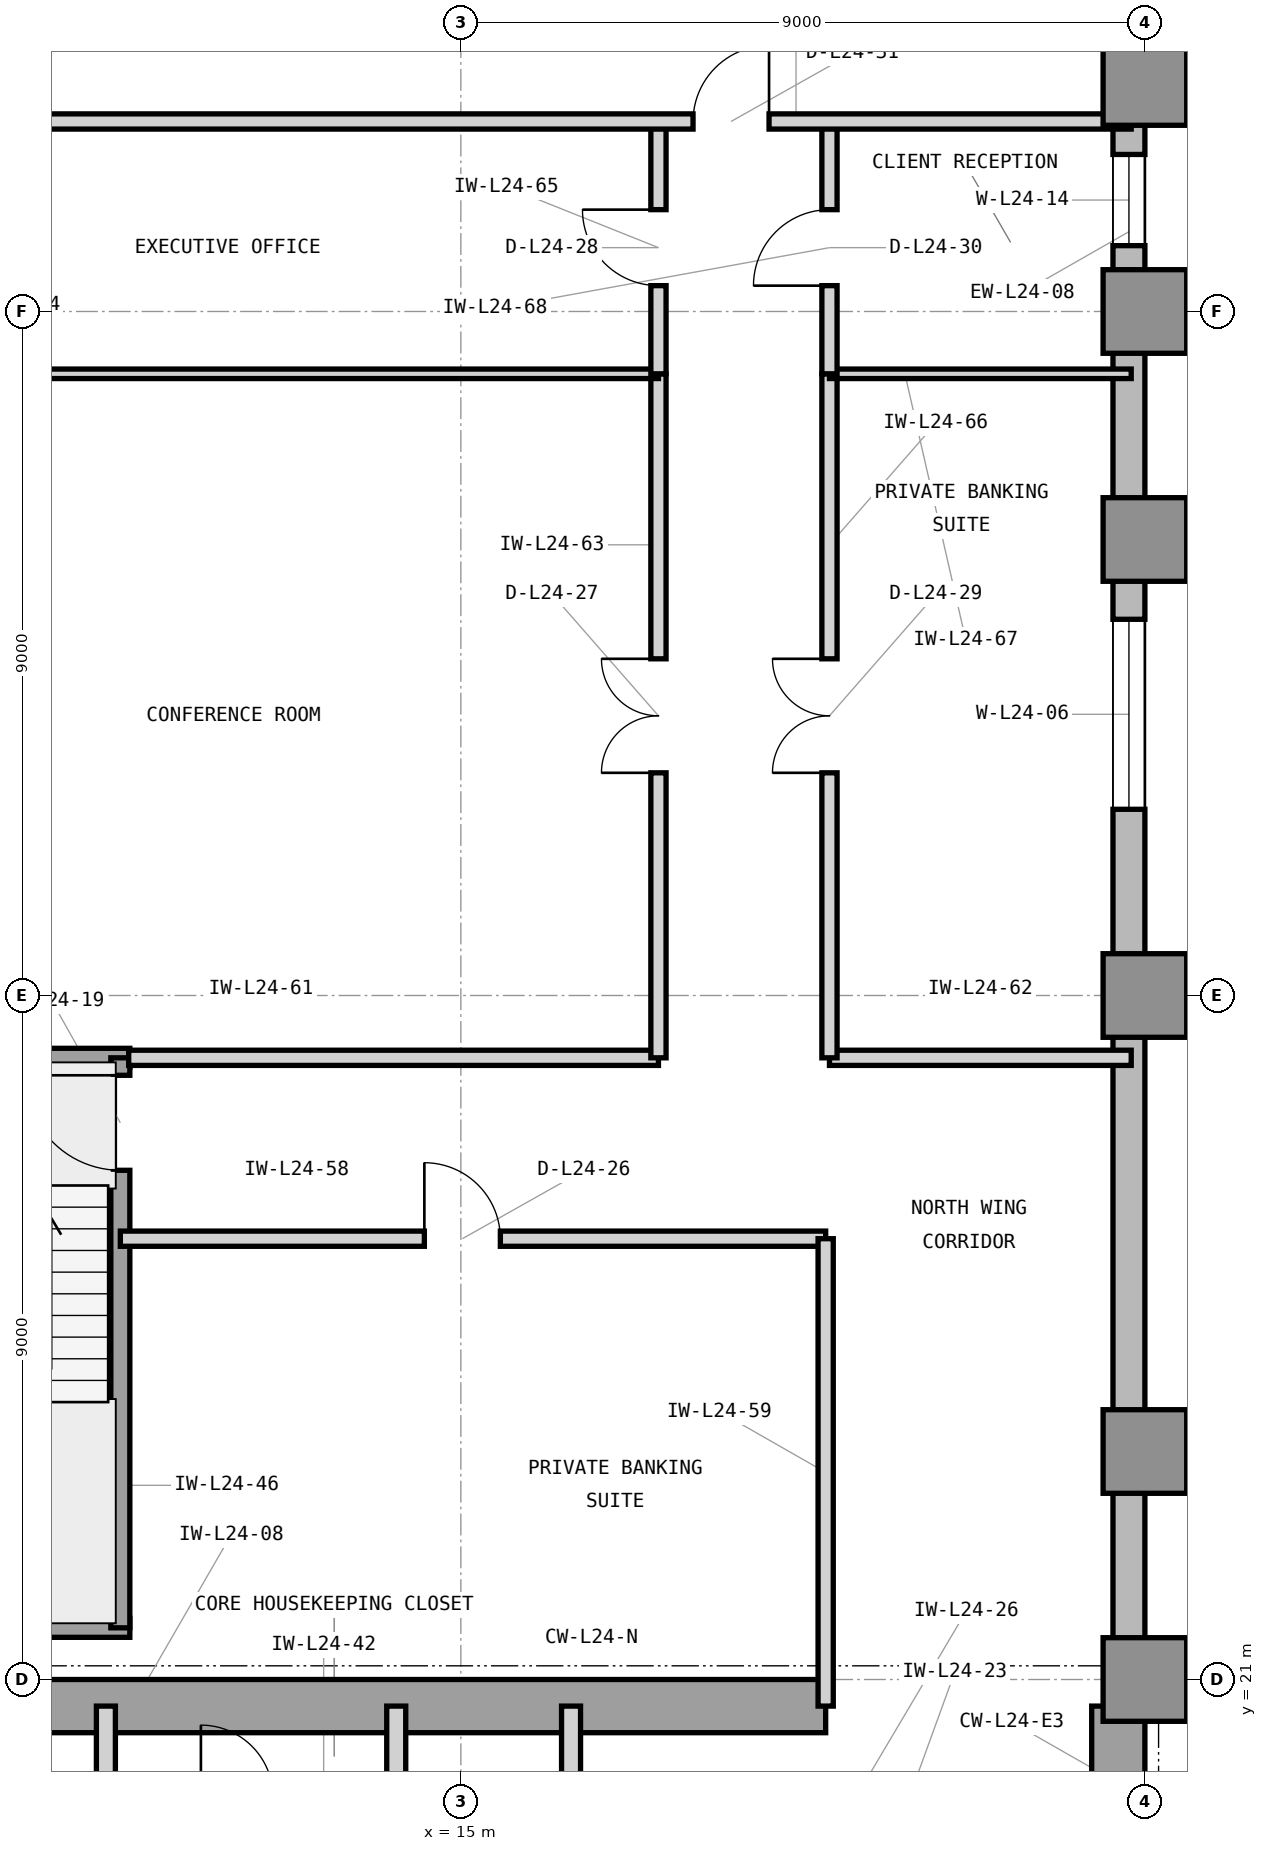
"""IFC4 building model, lengths in metres.
Left out: names, types, materials, properties, quantities, classifications, styles, units other than length and angle.
Written with IfcOpenShell. Run it as: python <this file> out.ifc"""

import sys

from ifc_helpers import new_model, si_unit, direction, frame, frame_2d, origin, origin_2d, place, context, subcontext, project, spatial, rectangle, extrude, element, fill, save


model = new_model("IFC4")
c1 = context("Model", 3, precision=1e-05, world=origin(), true_north=direction((0.0, 1.0)))
c2 = subcontext(c1, "Body", "Model", "MODEL_VIEW")
j1 = project(units=[si_unit("LENGTHUNIT", "METRE"), si_unit("PLANEANGLEUNIT", "RADIAN")], contexts=[c1])
p1 = place(None, origin())
s1 = spatial("IfcSite", under=j1, at=p1, CompositionType="ELEMENT")
p2 = place(p1, origin())
s2 = spatial("IfcBuilding", under=s1, at=p2, CompositionType="ELEMENT")
p3 = place(p2, frame((0.0, 0.0, 105.0)))
s3 = spatial("IfcBuildingStorey", under=s2, at=p3, CompositionType="ELEMENT", Elevation=105.0)
p4 = place(p3, frame((7.475, 20.65, 0.0), z_axis=(0.0, 0.0, 1.0), x_axis=(1.0, 0.0, 0.0)))
e1 = element("IfcWall", 1, at=p4, inside=s3, PredefinedType="SHEAR", context=c2, shape_type="SweptSolid", body=[
    extrude(rectangle(XDim=12.325, YDim=0.7, at=frame_2d((6.163, 0.0))), origin(), (0.0, 0.0, 1.0), 3.9),
])
p5 = place(p3, frame((23.65, 16.6, 0.0), z_axis=(0.0, 0.0, 1.0), x_axis=(0.0, 1.0, 0.0)))
e2 = element("IfcWall", 2, at=p5, inside=s3, PredefinedType="SHEAR", context=c2, shape_type="SweptSolid", body=[
    extrude(rectangle(XDim=4.05, YDim=0.7, at=frame_2d((2.025, 0.0))), origin(), (0.0, 0.0, 1.0), 3.9),
])
for number, where, z_axis, x_axis in (
    (3, (24.0, 21.0, 0.0), (0.0, 0.0, 1.0), (1.0, 0.0, 0.0)),
    (4, (24.0, 24.0, 0.0), (0.0, 0.0, 1.0), (1.0, 0.0, 0.0)),
    (5, (24.0, 30.0, 0.0), (0.0, 0.0, 1.0), (1.0, 0.0, 0.0)),
    (6, (24.0, 36.0, 0.0), (0.0, 0.0, 1.0), (1.0, 0.0, 0.0)),
    (7, (24.0, 39.0, 0.0), (0.0, 0.0, 1.0), (1.0, 0.0, 0.0)),
    (8, (24.0, 42.0, 0.0), (0.0, 0.0, 1.0), (1.0, 0.0, 0.0)),
):
    element("IfcColumn", number, at=place(p3, frame(where, z_axis=z_axis, x_axis=x_axis)), inside=s3, PredefinedType="COLUMN", context=c2, shape_type="SweptSolid", body=[
        extrude(rectangle(XDim=1.1, YDim=1.1, at=origin_2d()), origin(), (0.0, 0.0, 1.0), 3.9),
    ])
p6 = place(p3, frame((61.4, 20.79, 0.0), z_axis=(0.0, 0.0, 1.0), x_axis=(-1.0, 0.0, 0.0)))
e9 = element("IfcWall", 9, at=p6, inside=s3, PredefinedType="STANDARD", context=c2, shape_type="SweptSolid", body=[
    extrude(rectangle(XDim=37.4, YDim=0.42, at=frame_2d((18.7, 0.0))), origin(), (0.0, 0.0, 1.0), 3.7),
])
p7 = place(p6, frame((15.113, 0.0, 0.85)))
e10 = element("IfcOpeningElement", 10, at=p7, cuts=e9, PredefinedType="OPENING", context=c2, shape_type="SweptSolid", body=[
    extrude(rectangle(XDim=2.5, YDim=2.25, at=frame_2d((1.25, 1.125))), frame((0.0, 0.22, 0.0), z_axis=(0.0, -1.0, 0.0), x_axis=(1.0, 0.0, 0.0)), (0.0, 0.0, 1.0), 0.44),
])
p8 = place(p6, frame((24.462, 0.0, 0.85)))
e11 = element("IfcOpeningElement", 11, at=p8, cuts=e9, PredefinedType="OPENING", context=c2, shape_type="SweptSolid", body=[
    extrude(rectangle(XDim=2.5, YDim=2.25, at=frame_2d((1.25, 1.125))), frame((0.0, 0.22, 0.0), z_axis=(0.0, -1.0, 0.0), x_axis=(1.0, 0.0, 0.0)), (0.0, 0.0, 1.0), 0.44),
])
p9 = place(p3, frame((23.79, 21.0, 0.0), z_axis=(0.0, 0.0, 1.0), x_axis=(0.0, 1.0, 0.0)))
e12 = element("IfcWall", 12, at=p9, inside=s3, PredefinedType="STANDARD", context=c2, shape_type="SweptSolid", body=[
    extrude(rectangle(XDim=25.4, YDim=0.42, at=frame_2d((12.7, 0.0))), origin(), (0.0, 0.0, 1.0), 3.7),
])
p10 = place(p9, frame((11.45, 0.0, 0.85)))
e13 = element("IfcOpeningElement", 13, at=p10, cuts=e12, PredefinedType="OPENING", context=c2, shape_type="SweptSolid", body=[
    extrude(rectangle(XDim=2.5, YDim=2.25, at=frame_2d((1.25, 1.125))), frame((0.0, 0.22, 0.0), z_axis=(0.0, -1.0, 0.0), x_axis=(1.0, 0.0, 0.0)), (0.0, 0.0, 1.0), 0.44),
])
p11 = place(p9, frame((18.866, 0.0, 0.85)))
e14 = element("IfcOpeningElement", 14, at=p11, cuts=e12, PredefinedType="OPENING", context=c2, shape_type="SweptSolid", body=[
    extrude(rectangle(XDim=1.2, YDim=2.25, at=frame_2d((0.6, 1.125))), frame((0.0, 0.22, 0.0), z_axis=(0.0, -1.0, 0.0), x_axis=(1.0, 0.0, 0.0)), (0.0, 0.0, 1.0), 0.44),
])
p12 = place(p3, frame((10.33, 19.45, 0.0), z_axis=(0.0, 0.0, 1.0), x_axis=(0.0, 1.0, 0.0)))
e15 = element("IfcWall", 15, at=p12, inside=s3, PredefinedType="PARTITIONING", context=c2, shape_type="SweptSolid", body=[
    extrude(rectangle(XDim=1.2, YDim=0.25, at=frame_2d((0.6, 0.0))), origin(), (0.0, 0.0, 1.0), 2.917),
])
for number, where, z_axis, x_axis in (
    (16, (14.15, 16.7, 0.0), (0.0, 0.0, 1.0), (0.0, 1.0, 0.0)),
    (17, (16.45, 16.7, 0.0), (0.0, 0.0, 1.0), (0.0, 1.0, 0.0)),
):
    element("IfcWall", number, at=place(p3, frame(where, z_axis=z_axis, x_axis=x_axis)), inside=s3, PredefinedType="PARTITIONING", context=c2, shape_type="SweptSolid", body=[
        extrude(rectangle(XDim=3.95, YDim=0.25, at=frame_2d((1.975, 0.0))), origin(), (0.0, 0.0, 1.0), 3.69),
    ])
for number, where, z_axis, x_axis in (
    (18, (6.555, 21.68, 0.0), (0.0, 0.0, 1.0), (1.0, 0.0, 0.0)),
    (19, (6.555, 29.18, 0.0), (0.0, 0.0, 1.0), (1.0, 0.0, 0.0)),
):
    element("IfcWall", number, at=place(p3, frame(where, z_axis=z_axis, x_axis=x_axis)), inside=s3, PredefinedType="SHEAR", context=c2, shape_type="SweptSolid", body=[
        extrude(rectangle(XDim=4.09, YDim=0.25, at=frame_2d((2.045, 0.0))), origin(), (0.0, 0.0, 1.0), 3.9),
    ])
p13 = place(p3, frame((10.52, 21.68, 0.0), z_axis=(0.0, 0.0, 1.0), x_axis=(0.0, 1.0, 0.0)))
e20 = element("IfcWall", 20, at=p13, inside=s3, PredefinedType="SHEAR", context=c2, shape_type="SweptSolid", body=[
    extrude(rectangle(XDim=7.5, YDim=0.25, at=frame_2d((3.75, 0.0))), origin(), (0.0, 0.0, 1.0), 3.9),
])
p14 = place(p13, frame((6.02, 0.0, 0.0)))
e21 = element("IfcOpeningElement", 21, at=p14, cuts=e20, PredefinedType="OPENING", context=c2, shape_type="SweptSolid", body=[
    extrude(rectangle(XDim=1.25, YDim=2.2, at=frame_2d((0.625, 1.1))), frame((0.0, 0.135, 0.0), z_axis=(0.0, -1.0, 0.0), x_axis=(1.0, 0.0, 0.0)), (0.0, 0.0, 1.0), 0.27),
])
p15 = place(p3, frame((10.52, 26.8, 0.0), z_axis=(0.0, 0.0, 1.0), x_axis=(1.0, 0.0, 0.0)))
e22 = element("IfcWall", 22, at=p15, inside=s3, PredefinedType="PARTITIONING", context=c2, shape_type="SweptSolid", body=[
    extrude(rectangle(XDim=9.28, YDim=0.2, at=frame_2d((4.64, 0.0))), origin(), (0.0, 0.0, 1.0), 3.69),
])
p16 = place(p15, frame((4.0, 0.0, 0.0)))
e23 = element("IfcOpeningElement", 23, at=p16, cuts=e22, PredefinedType="OPENING", context=c2, shape_type="SweptSolid", body=[
    extrude(rectangle(XDim=1.0, YDim=2.15, at=frame_2d((0.5, 1.075))), frame((0.0, 0.11, 0.0), z_axis=(0.0, -1.0, 0.0), x_axis=(1.0, 0.0, 0.0)), (0.0, 0.0, 1.0), 0.22),
])
p17 = place(p3, frame((19.8, 20.65, 0.0), z_axis=(0.0, 0.0, 1.0), x_axis=(0.0, 1.0, 0.0)))
e24 = element("IfcWall", 24, at=p17, inside=s3, PredefinedType="PARTITIONING", context=c2, shape_type="SweptSolid", body=[
    extrude(rectangle(XDim=6.15, YDim=0.2, at=frame_2d((3.075, 0.0))), origin(), (0.0, 0.0, 1.0), 3.69),
])
p18 = place(p3, frame((10.63, 29.18, 0.0), z_axis=(0.0, 0.0, 1.0), x_axis=(1.0, 0.0, 0.0)))
e25 = element("IfcWall", 25, at=p18, inside=s3, PredefinedType="PARTITIONING", context=c2, shape_type="SweptSolid", body=[
    extrude(rectangle(XDim=6.97, YDim=0.2, at=frame_2d((3.485, 0.0))), origin(), (0.0, 0.0, 1.0), 3.69),
])
p19 = place(p3, frame((19.85, 29.18, 0.0), z_axis=(0.0, 0.0, 1.0), x_axis=(1.0, 0.0, 0.0)))
e26 = element("IfcWall", 26, at=p19, inside=s3, PredefinedType="PARTITIONING", context=c2, shape_type="SweptSolid", body=[
    extrude(rectangle(XDim=3.97, YDim=0.2, at=frame_2d((1.985, 0.0))), origin(), (0.0, 0.0, 1.0), 3.69),
])
p20 = place(p3, frame((17.6, 29.18, 0.0), z_axis=(0.0, 0.0, 1.0), x_axis=(0.0, 1.0, 0.0)))
e27 = element("IfcWall", 27, at=p20, inside=s3, PredefinedType="PARTITIONING", context=c2, shape_type="SweptSolid", body=[
    extrude(rectangle(XDim=9.0, YDim=0.2, at=frame_2d((4.5, 0.0))), origin(), (0.0, 0.0, 1.0), 3.69),
])
p21 = place(p20, frame((3.75, 0.0, 0.0)))
e28 = element("IfcOpeningElement", 28, at=p21, cuts=e27, PredefinedType="OPENING", context=c2, shape_type="SweptSolid", body=[
    extrude(rectangle(XDim=1.5, YDim=2.3, at=frame_2d((0.75, 1.15))), frame((0.0, 0.11, 0.0), z_axis=(0.0, -1.0, 0.0), x_axis=(1.0, 0.0, 0.0)), (0.0, 0.0, 1.0), 0.22),
])
p22 = place(p3, frame((6.18, 38.18, 0.0), z_axis=(0.0, 0.0, 1.0), x_axis=(1.0, 0.0, 0.0)))
e29 = element("IfcWall", 29, at=p22, inside=s3, PredefinedType="PARTITIONING", context=c2, shape_type="SweptSolid", body=[
    extrude(rectangle(XDim=11.42, YDim=0.125, at=frame_2d((5.71, 0.0))), origin(), (0.0, 0.0, 1.0), 3.69),
])
p23 = place(p3, frame((17.6, 38.18, 0.0), z_axis=(0.0, 0.0, 1.0), x_axis=(0.0, 1.0, 0.0)))
e30 = element("IfcWall", 30, at=p23, inside=s3, PredefinedType="PARTITIONING", context=c2, shape_type="SweptSolid", body=[
    extrude(rectangle(XDim=3.32, YDim=0.2, at=frame_2d((1.66, 0.0))), origin(), (0.0, 0.0, 1.0), 3.69),
])
p24 = place(p23, frame((1.16, 0.0, 0.0)))
e31 = element("IfcOpeningElement", 31, at=p24, cuts=e30, PredefinedType="OPENING", context=c2, shape_type="SweptSolid", body=[
    extrude(rectangle(XDim=1.0, YDim=2.15, at=frame_2d((0.5, 1.075))), frame((0.0, 0.11, 0.0), z_axis=(0.0, -1.0, 0.0), x_axis=(1.0, 0.0, 0.0)), (0.0, 0.0, 1.0), 0.22),
])
p25 = place(p3, frame((19.85, 29.18, 0.0), z_axis=(0.0, 0.0, 1.0), x_axis=(0.0, 1.0, 0.0)))
e32 = element("IfcWall", 32, at=p25, inside=s3, PredefinedType="PARTITIONING", context=c2, shape_type="SweptSolid", body=[
    extrude(rectangle(XDim=9.0, YDim=0.2, at=frame_2d((4.5, 0.0))), origin(), (0.0, 0.0, 1.0), 3.69),
])
p26 = place(p25, frame((3.75, 0.0, 0.0)))
e33 = element("IfcOpeningElement", 33, at=p26, cuts=e32, PredefinedType="OPENING", context=c2, shape_type="SweptSolid", body=[
    extrude(rectangle(XDim=1.5, YDim=2.3, at=frame_2d((0.75, 1.15))), frame((0.0, 0.11, 0.0), z_axis=(0.0, -1.0, 0.0), x_axis=(1.0, 0.0, 0.0)), (0.0, 0.0, 1.0), 0.22),
])
p27 = place(p3, frame((19.85, 38.18, 0.0), z_axis=(0.0, 0.0, 1.0), x_axis=(1.0, 0.0, 0.0)))
e34 = element("IfcWall", 34, at=p27, inside=s3, PredefinedType="PARTITIONING", context=c2, shape_type="SweptSolid", body=[
    extrude(rectangle(XDim=3.97, YDim=0.125, at=frame_2d((1.985, 0.0))), origin(), (0.0, 0.0, 1.0), 3.69),
])
p28 = place(p3, frame((19.85, 38.18, 0.0), z_axis=(0.0, 0.0, 1.0), x_axis=(0.0, 1.0, 0.0)))
e35 = element("IfcWall", 35, at=p28, inside=s3, PredefinedType="PARTITIONING", context=c2, shape_type="SweptSolid", body=[
    extrude(rectangle(XDim=3.32, YDim=0.2, at=frame_2d((1.66, 0.0))), origin(), (0.0, 0.0, 1.0), 3.69),
])
p29 = place(p28, frame((1.16, 0.0, 0.0)))
e36 = element("IfcOpeningElement", 36, at=p29, cuts=e35, PredefinedType="OPENING", context=c2, shape_type="SweptSolid", body=[
    extrude(rectangle(XDim=1.0, YDim=2.15, at=frame_2d((0.5, 1.075))), frame((0.0, 0.11, 0.0), z_axis=(0.0, -1.0, 0.0), x_axis=(1.0, 0.0, 0.0)), (0.0, 0.0, 1.0), 0.22),
])
p30 = place(p3, frame((6.18, 41.5, 0.0), z_axis=(0.0, 0.0, 1.0), x_axis=(1.0, 0.0, 0.0)))
e37 = element("IfcWall", 37, at=p30, inside=s3, PredefinedType="PARTITIONING", context=c2, shape_type="SweptSolid", body=[
    extrude(rectangle(XDim=17.64, YDim=0.2, at=frame_2d((8.82, 0.0))), origin(), (0.0, 0.0, 1.0), 3.69),
])
p31 = place(p30, frame((11.875, 0.0, 0.0)))
e38 = element("IfcOpeningElement", 38, at=p31, cuts=e37, PredefinedType="OPENING", context=c2, shape_type="SweptSolid", body=[
    extrude(rectangle(XDim=1.0, YDim=2.15, at=frame_2d((0.5, 1.075))), frame((0.0, 0.11, 0.0), z_axis=(0.0, -1.0, 0.0), x_axis=(1.0, 0.0, 0.0)), (0.0, 0.0, 1.0), 0.22),
])
p32 = place(p10, origin())
e39 = element("IfcWindow", 39, at=p32, inside=s3, PartitioningType="SINGLE_PANEL", PredefinedType="WINDOW", context=c2, shape_type="SweptSolid", body=[
    extrude(rectangle(XDim=2.5, YDim=2.25, at=frame_2d((1.25, 1.125))), frame((0.0, 0.11, 0.0), z_axis=(0.0, -1.0, 0.0), x_axis=(1.0, 0.0, 0.0)), (0.0, 0.0, 1.0), 0.06),
])
fill(e13, e39)
p33 = place(p14, origin())
e40 = element("IfcDoor", 40, at=p33, inside=s3, OperationType="SINGLE_SWING_RIGHT", PredefinedType="DOOR", context=c2, shape_type="SweptSolid", body=[
    extrude(rectangle(XDim=1.25, YDim=2.2, at=frame_2d((0.625, 1.1))), frame((0.0, 0.025, 0.0), z_axis=(0.0, -1.0, 0.0), x_axis=(1.0, 0.0, 0.0)), (0.0, 0.0, 1.0), 0.05),
])
fill(e21, e40)
p34 = place(p16, origin())
e41 = element("IfcDoor", 41, at=p34, inside=s3, OperationType="SINGLE_SWING_LEFT", PredefinedType="DOOR", context=c2, shape_type="SweptSolid", body=[
    extrude(rectangle(XDim=1.0, YDim=2.15, at=frame_2d((0.5, 1.075))), frame((0.0, 0.025, 0.0), z_axis=(0.0, -1.0, 0.0), x_axis=(1.0, 0.0, 0.0)), (0.0, 0.0, 1.0), 0.05),
])
fill(e23, e41)
p35 = place(p21, origin())
e42 = element("IfcDoor", 42, at=p35, inside=s3, OperationType="DOUBLE_DOOR_SINGLE_SWING", PredefinedType="DOOR", context=c2, shape_type="SweptSolid", body=[
    extrude(rectangle(XDim=1.5, YDim=2.3, at=frame_2d((0.75, 1.15))), frame((0.0, 0.025, 0.0), z_axis=(0.0, -1.0, 0.0), x_axis=(1.0, 0.0, 0.0)), (0.0, 0.0, 1.0), 0.05),
])
fill(e28, e42)
p36 = place(p24, origin())
e43 = element("IfcDoor", 43, at=p36, inside=s3, OperationType="SINGLE_SWING_RIGHT", PredefinedType="DOOR", context=c2, shape_type="SweptSolid", body=[
    extrude(rectangle(XDim=1.0, YDim=2.15, at=frame_2d((0.5, 1.075))), frame((0.0, 0.025, 0.0), z_axis=(0.0, -1.0, 0.0), x_axis=(1.0, 0.0, 0.0)), (0.0, 0.0, 1.0), 0.05),
])
fill(e31, e43)
p37 = place(p26, origin())
e44 = element("IfcDoor", 44, at=p37, inside=s3, OperationType="DOUBLE_DOOR_SINGLE_SWING", PredefinedType="DOOR", context=c2, shape_type="SweptSolid", body=[
    extrude(rectangle(XDim=1.5, YDim=2.3, at=frame_2d((0.75, 1.15))), frame((0.0, 0.025, 0.0), z_axis=(0.0, -1.0, 0.0), x_axis=(1.0, 0.0, 0.0)), (0.0, 0.0, 1.0), 0.05),
])
fill(e33, e44)
p38 = place(p29, origin())
e45 = element("IfcDoor", 45, at=p38, inside=s3, OperationType="SINGLE_SWING_LEFT", PredefinedType="DOOR", context=c2, shape_type="SweptSolid", body=[
    extrude(rectangle(XDim=1.0, YDim=2.15, at=frame_2d((0.5, 1.075))), frame((0.0, 0.025, 0.0), z_axis=(0.0, -1.0, 0.0), x_axis=(1.0, 0.0, 0.0)), (0.0, 0.0, 1.0), 0.05),
])
fill(e36, e45)
p39 = place(p31, origin())
e46 = element("IfcDoor", 46, at=p39, inside=s3, OperationType="SINGLE_SWING_RIGHT", PredefinedType="DOOR", context=c2, shape_type="SweptSolid", body=[
    extrude(rectangle(XDim=1.0, YDim=2.15, at=frame_2d((0.5, 1.075))), frame((0.0, 0.025, 0.0), z_axis=(0.0, -1.0, 0.0), x_axis=(1.0, 0.0, 0.0)), (0.0, 0.0, 1.0), 0.05),
])
fill(e38, e46)
p40 = place(p11, origin())
e47 = element("IfcWindow", 47, at=p40, inside=s3, PartitioningType="SINGLE_PANEL", PredefinedType="WINDOW", context=c2, shape_type="SweptSolid", body=[
    extrude(rectangle(XDim=1.2, YDim=2.25, at=frame_2d((0.6, 1.125))), frame((0.0, 0.11, 0.0), z_axis=(0.0, -1.0, 0.0), x_axis=(1.0, 0.0, 0.0)), (0.0, 0.0, 1.0), 0.06),
])
fill(e14, e47)
save(model, sys.argv[1])
